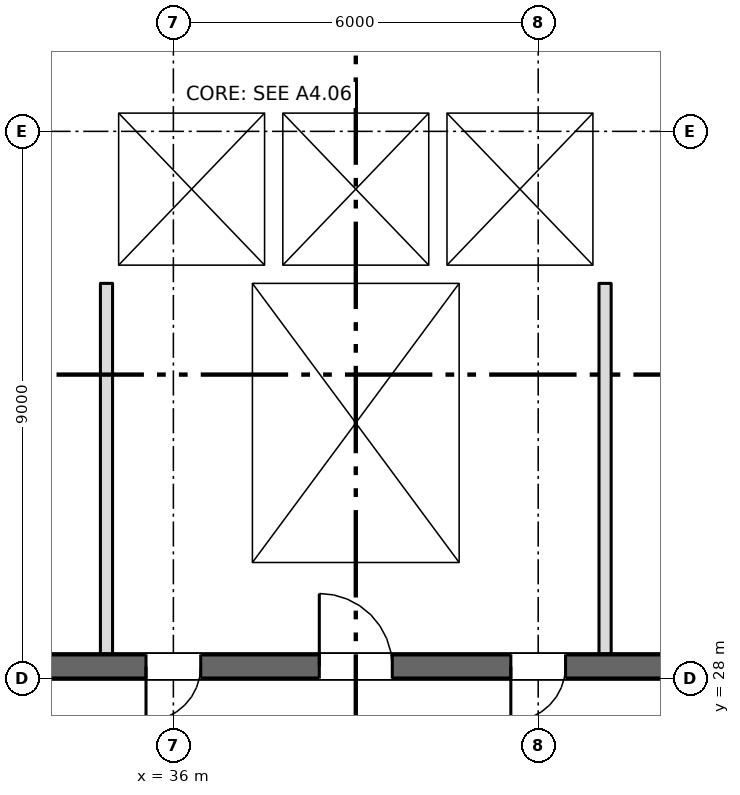
"""IFC4 building model, lengths in metres.
Left out: names, types, materials, properties, quantities, classifications, styles, units other than length and angle.
Written with IfcOpenShell. Run it as: python <this file> out.ifc"""

import sys

from ifc_helpers import new_model, si_unit, direction, frame, frame_2d, origin, place, context, subcontext, project, spatial, rectangle, extrude, element, fill, save


model = new_model("IFC4")
c1 = context("Model", 3, precision=1e-05, world=origin(), true_north=direction((0.0, 1.0)))
c2 = subcontext(c1, "Body", "Model", "MODEL_VIEW")
j1 = project(units=[si_unit("LENGTHUNIT", "METRE"), si_unit("PLANEANGLEUNIT", "RADIAN")], contexts=[c1])
p1 = place(None, origin())
s1 = spatial("IfcSite", under=j1, at=p1, CompositionType="ELEMENT")
p2 = place(p1, origin())
s2 = spatial("IfcBuilding", under=s1, at=p2, CompositionType="ELEMENT")
p3 = place(p2, frame((0.0, 0.0, 17.9)))
s3 = spatial("IfcBuildingStorey", under=s2, at=p3, CompositionType="ELEMENT", Elevation=17.9)
p4 = place(p3, frame((6.7, 28.2, 0.0), z_axis=(0.0, 0.0, 1.0), x_axis=(1.0, 0.0, 0.0)))
e1 = element("IfcWall", 1, at=p4, inside=s3, PredefinedType="SHEAR", context=c2, shape_type="SweptSolid", body=[
    extrude(rectangle(XDim=66.3, YDim=0.4, at=frame_2d((33.15, 0.0))), origin(), (0.0, 0.0, 1.0), 3.8),
])
p5 = place(p4, frame((12.562, 0.0, 0.0)))
e2 = element("IfcOpeningElement", 2, at=p5, cuts=e1, PredefinedType="OPENING", context=c2, shape_type="SweptSolid", body=[
    extrude(rectangle(XDim=0.9, YDim=2.1, at=frame_2d((0.45, 1.05))), frame((0.0, 0.21, 0.0), z_axis=(0.0, -1.0, 0.0), x_axis=(1.0, 0.0, 0.0)), (0.0, 0.0, 1.0), 0.42),
])
p6 = place(p4, frame((15.137, 0.0, 0.0)))
e3 = element("IfcOpeningElement", 3, at=p6, cuts=e1, PredefinedType="OPENING", context=c2, shape_type="SweptSolid", body=[
    extrude(rectangle(XDim=0.9, YDim=2.1, at=frame_2d((0.45, 1.05))), frame((0.0, 0.21, 0.0), z_axis=(0.0, -1.0, 0.0), x_axis=(1.0, 0.0, 0.0)), (0.0, 0.0, 1.0), 0.42),
])
p7 = place(p4, frame((49.85, 0.0, 0.0)))
e4 = element("IfcOpeningElement", 4, at=p7, cuts=e1, PredefinedType="OPENING", context=c2, shape_type="SweptSolid", body=[
    extrude(rectangle(XDim=0.9, YDim=2.1, at=frame_2d((0.45, 1.05))), frame((0.0, 0.21, 0.0), z_axis=(0.0, -1.0, 0.0), x_axis=(1.0, 0.0, 0.0)), (0.0, 0.0, 1.0), 0.42),
])
p8 = place(p4, frame((0.562, 0.0, 0.0)))
e5 = element("IfcOpeningElement", 5, at=p8, cuts=e1, PredefinedType="OPENING", context=c2, shape_type="SweptSolid", body=[
    extrude(rectangle(XDim=0.9, YDim=2.1, at=frame_2d((0.45, 1.05))), frame((0.0, 0.21, 0.0), z_axis=(0.0, -1.0, 0.0), x_axis=(1.0, 0.0, 0.0)), (0.0, 0.0, 1.0), 0.42),
])
p9 = place(p4, frame((2.137, 0.0, 0.0)))
e6 = element("IfcOpeningElement", 6, at=p9, cuts=e1, PredefinedType="OPENING", context=c2, shape_type="SweptSolid", body=[
    extrude(rectangle(XDim=0.9, YDim=2.1, at=frame_2d((0.45, 1.05))), frame((0.0, 0.21, 0.0), z_axis=(0.0, -1.0, 0.0), x_axis=(1.0, 0.0, 0.0)), (0.0, 0.0, 1.0), 0.42),
])
p10 = place(p4, frame((61.45, 0.0, 0.0)))
e7 = element("IfcOpeningElement", 7, at=p10, cuts=e1, PredefinedType="OPENING", context=c2, shape_type="SweptSolid", body=[
    extrude(rectangle(XDim=0.9, YDim=2.1, at=frame_2d((0.45, 1.05))), frame((0.0, 0.21, 0.0), z_axis=(0.0, -1.0, 0.0), x_axis=(1.0, 0.0, 0.0)), (0.0, 0.0, 1.0), 0.42),
])
p11 = place(p4, frame((4.7, 0.0, 0.0)))
e8 = element("IfcOpeningElement", 8, at=p11, cuts=e1, PredefinedType="OPENING", context=c2, shape_type="SweptSolid", body=[
    extrude(rectangle(XDim=1.2, YDim=2.1, at=frame_2d((0.6, 1.05))), frame((0.0, 0.21, 0.0), z_axis=(0.0, -1.0, 0.0), x_axis=(1.0, 0.0, 0.0)), (0.0, 0.0, 1.0), 0.42),
])
p12 = place(p4, frame((31.7, 0.0, 0.0)))
e9 = element("IfcOpeningElement", 9, at=p12, cuts=e1, PredefinedType="OPENING", context=c2, shape_type="SweptSolid", body=[
    extrude(rectangle(XDim=1.2, YDim=2.1, at=frame_2d((0.6, 1.05))), frame((0.0, 0.21, 0.0), z_axis=(0.0, -1.0, 0.0), x_axis=(1.0, 0.0, 0.0)), (0.0, 0.0, 1.0), 0.42),
])
p13 = place(p4, frame((55.2, 0.0, 0.0)))
e10 = element("IfcOpeningElement", 10, at=p13, cuts=e1, PredefinedType="OPENING", context=c2, shape_type="SweptSolid", body=[
    extrude(rectangle(XDim=1.2, YDim=2.1, at=frame_2d((0.6, 1.05))), frame((0.0, 0.21, 0.0), z_axis=(0.0, -1.0, 0.0), x_axis=(1.0, 0.0, 0.0)), (0.0, 0.0, 1.0), 0.42),
])
p14 = place(p4, frame((21.7, 0.0, 0.0)))
e11 = element("IfcOpeningElement", 11, at=p14, cuts=e1, PredefinedType="OPENING", context=c2, shape_type="SweptSolid", body=[
    extrude(rectangle(XDim=1.2, YDim=2.1, at=frame_2d((0.6, 1.05))), frame((0.0, 0.21, 0.0), z_axis=(0.0, -1.0, 0.0), x_axis=(1.0, 0.0, 0.0)), (0.0, 0.0, 1.0), 0.42),
])
p15 = place(p4, frame((41.7, 0.0, 0.0)))
e12 = element("IfcOpeningElement", 12, at=p15, cuts=e1, PredefinedType="OPENING", context=c2, shape_type="SweptSolid", body=[
    extrude(rectangle(XDim=1.2, YDim=2.1, at=frame_2d((0.6, 1.05))), frame((0.0, 0.21, 0.0), z_axis=(0.0, -1.0, 0.0), x_axis=(1.0, 0.0, 0.0)), (0.0, 0.0, 1.0), 0.42),
])
p16 = place(p4, frame((24.85, 0.0, 0.0)))
e13 = element("IfcOpeningElement", 13, at=p16, cuts=e1, PredefinedType="OPENING", context=c2, shape_type="SweptSolid", body=[
    extrude(rectangle(XDim=2.4, YDim=2.1, at=frame_2d((1.2, 1.05))), frame((0.0, 0.21, 0.0), z_axis=(0.0, -1.0, 0.0), x_axis=(1.0, 0.0, 0.0)), (0.0, 0.0, 1.0), 0.42),
])
p17 = place(p4, frame((37.35, 0.0, 0.0)))
e14 = element("IfcOpeningElement", 14, at=p17, cuts=e1, PredefinedType="OPENING", context=c2, shape_type="SweptSolid", body=[
    extrude(rectangle(XDim=2.4, YDim=2.1, at=frame_2d((1.2, 1.05))), frame((0.0, 0.21, 0.0), z_axis=(0.0, -1.0, 0.0), x_axis=(1.0, 0.0, 0.0)), (0.0, 0.0, 1.0), 0.42),
])
p18 = place(p4, frame((7.8, 0.0, 0.0)))
e15 = element("IfcOpeningElement", 15, at=p18, cuts=e1, PredefinedType="OPENING", context=c2, shape_type="SweptSolid", body=[
    extrude(rectangle(XDim=2.4, YDim=2.1, at=frame_2d((1.2, 1.05))), frame((0.0, 0.21, 0.0), z_axis=(0.0, -1.0, 0.0), x_axis=(1.0, 0.0, 0.0)), (0.0, 0.0, 1.0), 0.42),
])
p19 = place(p4, frame((28.85, 0.0, 0.0)))
e16 = element("IfcOpeningElement", 16, at=p19, cuts=e1, PredefinedType="OPENING", context=c2, shape_type="SweptSolid", body=[
    extrude(rectangle(XDim=0.9, YDim=2.1, at=frame_2d((0.45, 1.05))), frame((0.0, 0.21, 0.0), z_axis=(0.0, -1.0, 0.0), x_axis=(1.0, 0.0, 0.0)), (0.0, 0.0, 1.0), 0.42),
])
p20 = place(p4, frame((34.85, 0.0, 0.0)))
e17 = element("IfcOpeningElement", 17, at=p20, cuts=e1, PredefinedType="OPENING", context=c2, shape_type="SweptSolid", body=[
    extrude(rectangle(XDim=0.9, YDim=2.1, at=frame_2d((0.45, 1.05))), frame((0.0, 0.21, 0.0), z_axis=(0.0, -1.0, 0.0), x_axis=(1.0, 0.0, 0.0)), (0.0, 0.0, 1.0), 0.42),
])
for number, where, z_axis, x_axis in (
    (18, (37.15, 28.4, 0.0), (0.0, 0.0, 1.0), (0.0, 1.0, 0.0)),
    (19, (40.85, 28.4, 0.0), (0.0, 0.0, 1.0), (0.0, 1.0, 0.0)),
):
    element("IfcWall", number, at=place(p3, frame(where, z_axis=z_axis, x_axis=x_axis)), inside=s3, PredefinedType="SHEAR", context=c2, shape_type="SweptSolid", body=[
        extrude(rectangle(XDim=6.1, YDim=0.3, at=frame_2d((3.05, 0.0))), origin(), (0.0, 0.0, 1.0), 3.8),
    ])
p21 = place(p3, frame((34.8, 34.65, 0.0), z_axis=(0.0, 0.0, 1.0), x_axis=(1.0, 0.0, 0.0)))
e20 = element("IfcWall", 20, at=p21, inside=s3, PredefinedType="SHEAR", context=c2, shape_type="SweptSolid", body=[
    extrude(rectangle(XDim=8.4, YDim=0.3, at=frame_2d((4.2, 0.0))), origin(), (0.0, 0.0, 1.0), 3.8),
])
p22 = place(p3, frame((34.8, 37.45, 0.0), z_axis=(0.0, 0.0, 1.0), x_axis=(1.0, 0.0, 0.0)))
e21 = element("IfcWall", 21, at=p22, inside=s3, PredefinedType="SHEAR", context=c2, shape_type="SweptSolid", body=[
    extrude(rectangle(XDim=8.4, YDim=0.3, at=frame_2d((4.2, 0.0))), origin(), (0.0, 0.0, 1.0), 3.8),
])
p23 = place(p22, frame((0.95, 0.0, 0.0)))
e22 = element("IfcOpeningElement", 22, at=p23, cuts=e21, PredefinedType="OPENING", context=c2, shape_type="SweptSolid", body=[
    extrude(rectangle(XDim=1.1, YDim=2.1, at=frame_2d((0.55, 1.05))), frame((0.0, 0.16, 0.0), z_axis=(0.0, -1.0, 0.0), x_axis=(1.0, 0.0, 0.0)), (0.0, 0.0, 1.0), 0.32),
])
p24 = place(p22, frame((3.65, 0.0, 0.0)))
e23 = element("IfcOpeningElement", 23, at=p24, cuts=e21, PredefinedType="OPENING", context=c2, shape_type="SweptSolid", body=[
    extrude(rectangle(XDim=1.1, YDim=2.1, at=frame_2d((0.55, 1.05))), frame((0.0, 0.16, 0.0), z_axis=(0.0, -1.0, 0.0), x_axis=(1.0, 0.0, 0.0)), (0.0, 0.0, 1.0), 0.32),
])
p25 = place(p22, frame((6.35, 0.0, 0.0)))
e24 = element("IfcOpeningElement", 24, at=p25, cuts=e21, PredefinedType="OPENING", context=c2, shape_type="SweptSolid", body=[
    extrude(rectangle(XDim=1.1, YDim=2.1, at=frame_2d((0.55, 1.05))), frame((0.0, 0.16, 0.0), z_axis=(0.0, -1.0, 0.0), x_axis=(1.0, 0.0, 0.0)), (0.0, 0.0, 1.0), 0.32),
])
for number, where, z_axis, x_axis in (
    (25, (34.95, 34.8, 0.0), (0.0, 0.0, 1.0), (0.0, 1.0, 0.0)),
    (26, (43.05, 34.8, 0.0), (0.0, 0.0, 1.0), (0.0, 1.0, 0.0)),
    (27, (37.65, 34.8, 0.0), (0.0, 0.0, 1.0), (0.0, 1.0, 0.0)),
    (28, (40.35, 34.8, 0.0), (0.0, 0.0, 1.0), (0.0, 1.0, 0.0)),
):
    element("IfcWall", number, at=place(p3, frame(where, z_axis=z_axis, x_axis=x_axis)), inside=s3, PredefinedType="SHEAR", context=c2, shape_type="SweptSolid", body=[
        extrude(rectangle(XDim=2.5, YDim=0.3, at=frame_2d((1.25, 0.0))), origin(), (0.0, 0.0, 1.0), 3.8),
    ])
for number, where, z_axis, x_axis in (
    (29, (34.9, 28.4, 0.0), (0.0, 0.0, 1.0), (0.0, 1.0, 0.0)),
    (30, (43.1, 28.4, 0.0), (0.0, 0.0, 1.0), (0.0, 1.0, 0.0)),
):
    element("IfcWall", number, at=place(p3, frame(where, z_axis=z_axis, x_axis=x_axis)), inside=s3, PredefinedType="PARTITIONING", context=c2, shape_type="SweptSolid", body=[
        extrude(rectangle(XDim=6.1, YDim=0.2, at=frame_2d((3.05, 0.0))), origin(), (0.0, 0.0, 1.0), 3.8),
    ])
p26 = place(p23, origin())
e31 = element("IfcDoor", 31, at=p26, inside=s3, OperationType="SLIDING_TO_LEFT", PredefinedType="DOOR", context=c2, shape_type="SweptSolid", body=[
    extrude(rectangle(XDim=1.1, YDim=2.1, at=frame_2d((0.55, 1.05))), frame((0.0, 0.025, 0.0), z_axis=(0.0, -1.0, 0.0), x_axis=(1.0, 0.0, 0.0)), (0.0, 0.0, 1.0), 0.05),
])
fill(e22, e31)
p27 = place(p24, origin())
e32 = element("IfcDoor", 32, at=p27, inside=s3, OperationType="SLIDING_TO_LEFT", PredefinedType="DOOR", context=c2, shape_type="SweptSolid", body=[
    extrude(rectangle(XDim=1.1, YDim=2.1, at=frame_2d((0.55, 1.05))), frame((0.0, 0.025, 0.0), z_axis=(0.0, -1.0, 0.0), x_axis=(1.0, 0.0, 0.0)), (0.0, 0.0, 1.0), 0.05),
])
fill(e23, e32)
p28 = place(p25, origin())
e33 = element("IfcDoor", 33, at=p28, inside=s3, OperationType="SLIDING_TO_LEFT", PredefinedType="DOOR", context=c2, shape_type="SweptSolid", body=[
    extrude(rectangle(XDim=1.1, YDim=2.1, at=frame_2d((0.55, 1.05))), frame((0.0, 0.025, 0.0), z_axis=(0.0, -1.0, 0.0), x_axis=(1.0, 0.0, 0.0)), (0.0, 0.0, 1.0), 0.05),
])
fill(e24, e33)
p29 = place(p12, origin())
e34 = element("IfcDoor", 34, at=p29, inside=s3, OperationType="SINGLE_SWING_LEFT", PredefinedType="DOOR", context=c2, shape_type="SweptSolid", body=[
    extrude(rectangle(XDim=1.2, YDim=2.1, at=frame_2d((0.6, 1.05))), frame((0.0, 0.025, 0.0), z_axis=(0.0, -1.0, 0.0), x_axis=(1.0, 0.0, 0.0)), (0.0, 0.0, 1.0), 0.05),
])
fill(e9, e34)
p30 = place(p19, origin())
e35 = element("IfcDoor", 35, at=p30, inside=s3, OperationType="SINGLE_SWING_LEFT", PredefinedType="DOOR", context=c2, shape_type="SweptSolid", body=[
    extrude(rectangle(XDim=0.9, YDim=2.1, at=frame_2d((0.45, 1.05))), frame((0.0, 0.025, 0.0), z_axis=(0.0, -1.0, 0.0), x_axis=(1.0, 0.0, 0.0)), (0.0, 0.0, 1.0), 0.05),
])
fill(e16, e35)
p31 = place(p20, origin())
e36 = element("IfcDoor", 36, at=p31, inside=s3, OperationType="SINGLE_SWING_LEFT", PredefinedType="DOOR", context=c2, shape_type="SweptSolid", body=[
    extrude(rectangle(XDim=0.9, YDim=2.1, at=frame_2d((0.45, 1.05))), frame((0.0, 0.025, 0.0), z_axis=(0.0, -1.0, 0.0), x_axis=(1.0, 0.0, 0.0)), (0.0, 0.0, 1.0), 0.05),
])
fill(e17, e36)
save(model, sys.argv[1])
